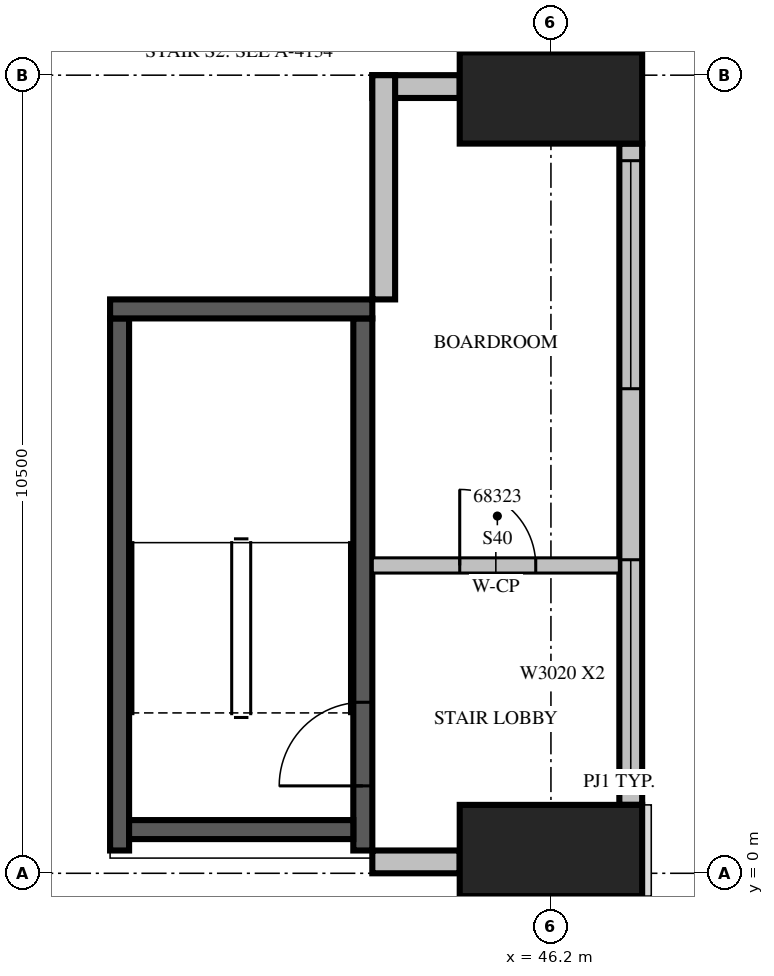
"""IFC4 building model, lengths in metres.
Left out: names, types, materials, properties, quantities, classifications, styles, units other than length and angle.
Written with IfcOpenShell. Run it as: python <this file> out.ifc"""

import sys

from ifc_helpers import new_model, si_unit, direction, frame, frame_2d, origin, origin_2d, place, context, subcontext, project, spatial, rectangle, extrude, source, transform, mapped, element, fill, save


model = new_model("IFC4")
c1 = context("Model", 3, precision=1e-05, world=origin(), true_north=direction((0.0, 1.0)))
c2 = subcontext(c1, "Body", "Model", "MODEL_VIEW")
j1 = project(units=[si_unit("LENGTHUNIT", "METRE"), si_unit("PLANEANGLEUNIT", "RADIAN")], contexts=[c1])
p1 = place(None, origin())
s1 = spatial("IfcSite", under=j1, at=p1, CompositionType="ELEMENT")
p2 = place(p1, origin())
s2 = spatial("IfcBuilding", under=s1, at=p2, CompositionType="ELEMENT")
p3 = place(p2, frame((0.0, 0.0, 340.5)))
s3 = spatial("IfcBuildingStorey", under=s2, at=p3, CompositionType="ELEMENT", Elevation=340.5)
m1 = source(origin(), c2, "Body", "SweptSolid", [
    extrude(rectangle(XDim=2.4, YDim=1.2, at=origin_2d()), origin(), (0.0, 0.0, 1.0), 3.5),
])
for number, where, z_axis, x_axis in (
    (1, (46.2, 0.3, 0.0), (0.0, 0.0, 1.0), (1.0, 0.0, 0.0)),
    (2, (46.2, 10.2, 0.0), (0.0, 0.0, 1.0), (1.0, 0.0, 0.0)),
):
    element("IfcColumn", number, at=place(p3, frame(where, z_axis=z_axis, x_axis=x_axis)), inside=s3, PredefinedType="PILASTER", context=c2, shape_type="MappedRepresentation", body=[
        mapped(m1, transform((0.0, 0.0, 0.0), scale=1.0)),
    ])
m2 = source(origin(), c2, "Body", "SweptSolid", [
    extrude(rectangle(XDim=1.15, YDim=0.3, at=frame_2d((0.575, 0.0))), origin(), (0.0, 0.0, 1.0), 3.1),
])
p4 = place(p3, frame((43.85, 0.15, 0.0), z_axis=(0.0, 0.0, 1.0), x_axis=(1.0, 0.0, 0.0)))
e3 = element("IfcWall", 3, at=p4, inside=s3, PredefinedType="STANDARD", context=c2, shape_type="MappedRepresentation", body=[
    mapped(m2, transform((0.0, 0.0, 0.0), scale=1.0)),
])
m3 = source(origin(), c2, "Body", "SweptSolid", [
    extrude(rectangle(XDim=8.7, YDim=0.3, at=frame_2d((4.35, 0.0))), origin(), (0.0, 0.0, 1.0), 3.1),
])
p5 = place(p3, frame((47.25, 0.9, 0.0), z_axis=(0.0, 0.0, 1.0), x_axis=(0.0, 1.0, 0.0)))
e4 = element("IfcWall", 4, at=p5, inside=s3, PredefinedType="STANDARD", context=c2, shape_type="MappedRepresentation", body=[
    mapped(m3, transform((0.0, 0.0, 0.0), scale=1.0)),
])
m4 = source(origin(), c2, "Body", "SweptSolid", [
    extrude(rectangle(XDim=3.0, YDim=2.0, at=frame_2d((1.5, 1.0))), frame((0.0, 0.16, 0.0), z_axis=(0.0, -1.0, 0.0), x_axis=(1.0, 0.0, 0.0)), (0.0, 0.0, 1.0), 0.32),
])
p6 = place(p5, frame((0.225, 0.0, 0.6)))
e5 = element("IfcOpeningElement", 5, at=p6, cuts=e4, PredefinedType="OPENING", context=c2, shape_type="MappedRepresentation", body=[
    mapped(m4, transform((0.0, 0.0, 0.0), scale=1.0)),
])
p7 = place(p5, frame((5.475, 0.0, 0.6)))
e6 = element("IfcOpeningElement", 6, at=p7, cuts=e4, PredefinedType="OPENING", context=c2, shape_type="MappedRepresentation", body=[
    mapped(m4, transform((0.0, 0.0, 0.0), scale=1.0)),
])
p8 = place(p3, frame((45.0, 10.35, 0.0), z_axis=(0.0, 0.0, 1.0), x_axis=(-1.0, 0.0, 0.0)))
e7 = element("IfcWall", 7, at=p8, inside=s3, PredefinedType="STANDARD", context=c2, shape_type="MappedRepresentation", body=[
    mapped(m2, transform((0.0, 0.0, 0.0), scale=1.0)),
])
m5 = source(origin(), c2, "Body", "SweptSolid", [
    extrude(rectangle(XDim=2.95, YDim=0.3, at=frame_2d((1.475, 0.0))), origin(), (0.0, 0.0, 1.0), 3.1),
])
p9 = place(p3, frame((44.0, 10.5, 0.0), z_axis=(0.0, 0.0, 1.0), x_axis=(0.0, -1.0, 0.0)))
e8 = element("IfcWall", 8, at=p9, inside=s3, PredefinedType="STANDARD", context=c2, shape_type="MappedRepresentation", body=[
    mapped(m5, transform((0.0, 0.0, 0.0), scale=1.0)),
])
m6 = source(origin(), c2, "Body", "SweptSolid", [
    extrude(rectangle(XDim=7.0, YDim=0.25, at=frame_2d((3.5, 0.0))), origin(), (0.0, 0.0, 1.0), 3.1),
])
p10 = place(p3, frame((40.525, 0.3, 0.0), z_axis=(0.0, 0.0, 1.0), x_axis=(0.0, 1.0, 0.0)))
e9 = element("IfcWall", 9, at=p10, inside=s3, PredefinedType="SOLIDWALL", context=c2, shape_type="MappedRepresentation", body=[
    mapped(m6, transform((0.0, 0.0, 0.0), scale=1.0)),
])
p11 = place(p3, frame((43.725, 0.3, 0.0), z_axis=(0.0, 0.0, 1.0), x_axis=(0.0, 1.0, 0.0)))
e10 = element("IfcWall", 10, at=p11, inside=s3, PredefinedType="SOLIDWALL", context=c2, shape_type="MappedRepresentation", body=[
    mapped(m6, transform((0.0, 0.0, 0.0), scale=1.0)),
])
m7 = source(origin(), c2, "Body", "SweptSolid", [
    extrude(rectangle(XDim=1.1, YDim=2.1, at=frame_2d((0.55, 1.05))), frame((0.0, 0.135, 0.0), z_axis=(0.0, -1.0, 0.0), x_axis=(1.0, 0.0, 0.0)), (0.0, 0.0, 1.0), 0.27),
])
p12 = place(p11, frame((0.85, 0.0, 0.0)))
e11 = element("IfcOpeningElement", 11, at=p12, cuts=e10, PredefinedType="OPENING", context=c2, shape_type="MappedRepresentation", body=[
    mapped(m7, transform((0.0, 0.0, 0.0), scale=1.0)),
])
m8 = source(origin(), c2, "Body", "SweptSolid", [
    extrude(rectangle(XDim=3.45, YDim=0.25, at=frame_2d((1.725, 0.0))), origin(), (0.0, 0.0, 1.0), 3.1),
])
p13 = place(p3, frame((40.4, 7.425, 0.0), z_axis=(0.0, 0.0, 1.0), x_axis=(1.0, 0.0, 0.0)))
e12 = element("IfcWall", 12, at=p13, inside=s3, PredefinedType="SOLIDWALL", context=c2, shape_type="MappedRepresentation", body=[
    mapped(m8, transform((0.0, 0.0, 0.0), scale=1.0)),
])
m9 = source(origin(), c2, "Body", "SweptSolid", [
    extrude(rectangle(XDim=2.95, YDim=0.25, at=frame_2d((1.475, 0.0))), origin(), (0.0, 0.0, 1.0), 3.1),
])
p14 = place(p3, frame((40.65, 0.575, 0.0), z_axis=(0.0, 0.0, 1.0), x_axis=(1.0, 0.0, 0.0)))
e13 = element("IfcWall", 13, at=p14, inside=s3, PredefinedType="SOLIDWALL", context=c2, shape_type="MappedRepresentation", body=[
    mapped(m9, transform((0.0, 0.0, 0.0), scale=1.0)),
])
p15 = place(p3, frame((43.85, 4.05, 0.0), z_axis=(0.0, 0.0, 1.0), x_axis=(1.0, 0.0, 0.0)))
e14 = element("IfcWall", 14, at=p15, inside=s3, PredefinedType="PARTITIONING", context=c2, shape_type="SweptSolid", body=[
    extrude(rectangle(XDim=3.25, YDim=0.2, at=frame_2d((1.625, 0.0))), origin(), (0.0, 0.0, 1.0), 3.1),
])
m10 = source(origin(), c2, "Body", "SweptSolid", [
    extrude(rectangle(XDim=1.0, YDim=2.1, at=frame_2d((0.5, 1.05))), frame((0.0, 0.11, 0.0), z_axis=(0.0, -1.0, 0.0), x_axis=(1.0, 0.0, 0.0)), (0.0, 0.0, 1.0), 0.22),
])
p16 = place(p15, frame((1.15, 0.0, 0.0)))
e15 = element("IfcOpeningElement", 15, at=p16, cuts=e14, PredefinedType="OPENING", context=c2, shape_type="MappedRepresentation", body=[
    mapped(m10, transform((0.0, 0.0, 0.0), scale=1.0)),
])
m11 = source(origin(), c2, "Body", "SweptSolid", [
    extrude(rectangle(XDim=3.0, YDim=2.0, at=frame_2d((1.5, 1.0))), frame((0.0, 0.03, 0.0), z_axis=(0.0, -1.0, 0.0), x_axis=(1.0, 0.0, 0.0)), (0.0, 0.0, 1.0), 0.06),
])
p17 = place(p6, origin())
e16 = element("IfcWindow", 16, at=p17, inside=s3, PartitioningType="SINGLE_PANEL", PredefinedType="WINDOW", context=c2, shape_type="MappedRepresentation", body=[
    mapped(m11, transform((0.0, 0.0, 0.0), scale=1.0)),
])
fill(e5, e16)
p18 = place(p7, origin())
e17 = element("IfcWindow", 17, at=p18, inside=s3, PartitioningType="SINGLE_PANEL", PredefinedType="WINDOW", context=c2, shape_type="MappedRepresentation", body=[
    mapped(m11, transform((0.0, 0.0, 0.0), scale=1.0)),
])
fill(e6, e17)
m12 = source(origin(), c2, "Body", "SweptSolid", [
    extrude(rectangle(XDim=1.1, YDim=2.1, at=frame_2d((0.55, 1.05))), frame((0.0, 0.025, 0.0), z_axis=(0.0, -1.0, 0.0), x_axis=(1.0, 0.0, 0.0)), (0.0, 0.0, 1.0), 0.05),
])
p19 = place(p12, origin())
e18 = element("IfcDoor", 18, at=p19, inside=s3, OperationType="SINGLE_SWING_LEFT", PredefinedType="DOOR", context=c2, shape_type="MappedRepresentation", body=[
    mapped(m12, transform((0.0, 0.0, 0.0), scale=1.0)),
])
fill(e11, e18)
m13 = source(origin(), c2, "Body", "SweptSolid", [
    extrude(rectangle(XDim=1.0, YDim=2.1, at=frame_2d((0.5, 1.05))), frame((0.0, 0.025, 0.0), z_axis=(0.0, -1.0, 0.0), x_axis=(1.0, 0.0, 0.0)), (0.0, 0.0, 1.0), 0.05),
])
p20 = place(p16, origin())
e19 = element("IfcDoor", 19, at=p20, inside=s3, OperationType="SINGLE_SWING_LEFT", PredefinedType="DOOR", context=c2, shape_type="MappedRepresentation", body=[
    mapped(m13, transform((0.0, 0.0, 0.0), scale=1.0)),
])
fill(e15, e19)
save(model, sys.argv[1])
